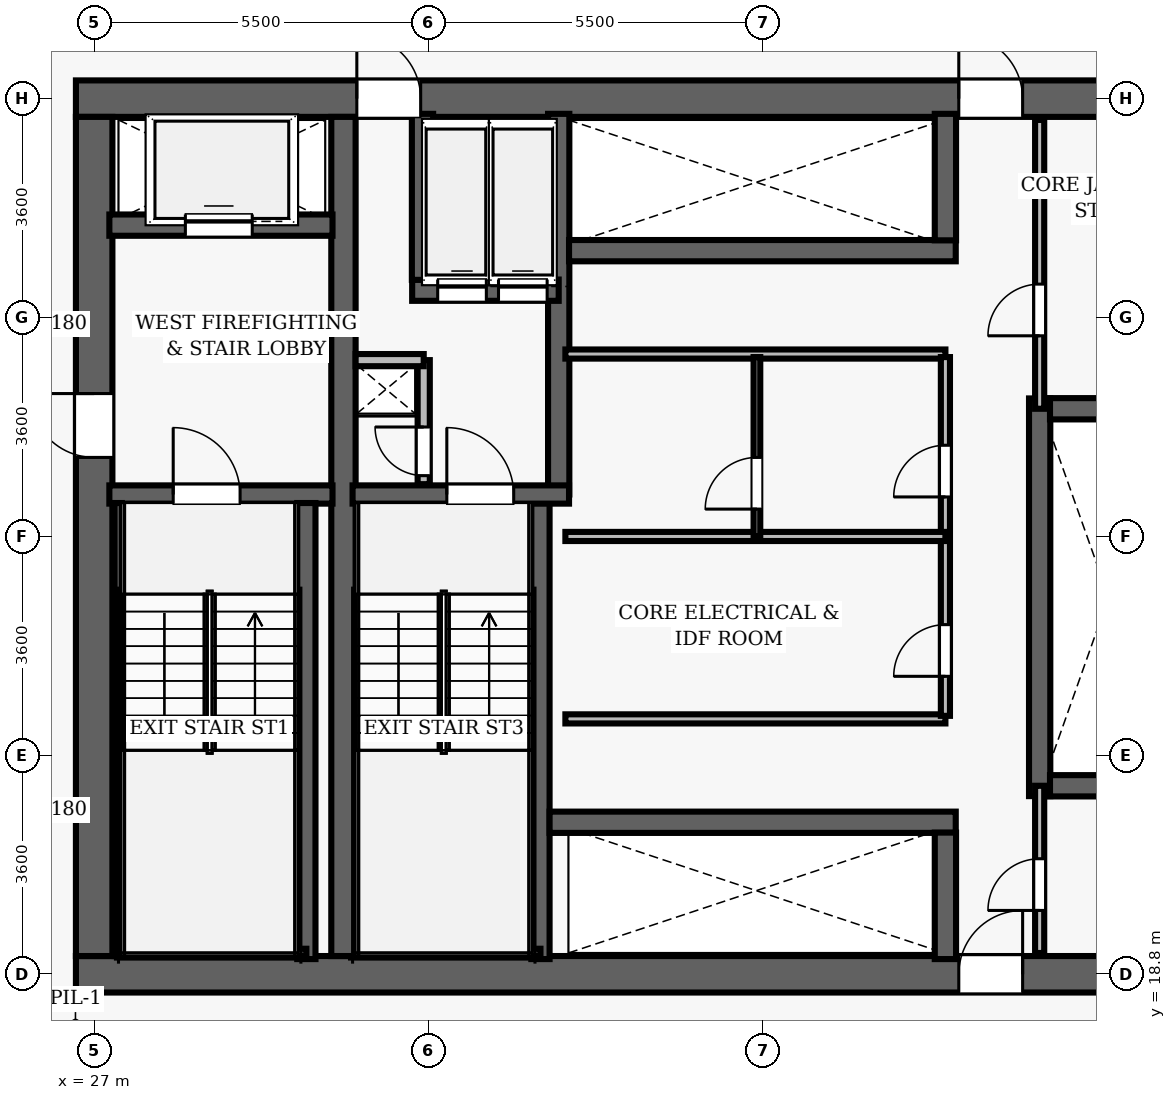
"""IFC4 building model, lengths in metres.
Left out: names, types, materials, properties, quantities, classifications, styles, units other than length and angle.
Written with IfcOpenShell. Run it as: python <this file> out.ifc"""

import sys

from ifc_helpers import new_model, si_unit, direction, frame, frame_2d, origin, place, context, subcontext, project, spatial, rectangle, extrude, element, fill, save


model = new_model("IFC4")
c1 = context("Model", 3, precision=1e-05, world=origin(), true_north=direction((0.0, 1.0)))
c2 = subcontext(c1, "Body", "Model", "MODEL_VIEW")
j1 = project(units=[si_unit("LENGTHUNIT", "METRE"), si_unit("PLANEANGLEUNIT", "RADIAN")], contexts=[c1])
p1 = place(None, origin())
s1 = spatial("IfcSite", under=j1, at=p1, CompositionType="ELEMENT")
p2 = place(p1, origin())
s2 = spatial("IfcBuilding", under=s1, at=p2, CompositionType="ELEMENT")
p3 = place(p2, frame((0.0, 0.0, 12.0)))
s3 = spatial("IfcBuildingStorey", under=s2, at=p3, CompositionType="ELEMENT", Elevation=12.0)
p4 = place(p3, frame((26.7, 18.8, 0.0), z_axis=(0.0, 0.0, 1.0), x_axis=(1.0, 0.0, 0.0)))
e1 = element("IfcWall", 1, at=p4, inside=s3, PredefinedType="SHEAR", context=c2, shape_type="SweptSolid", body=[
    extrude(rectangle(XDim=22.6, YDim=0.6, at=frame_2d((11.3, 0.0))), origin(), (0.0, 0.0, 1.0), 6.6),
])
p5 = place(p4, frame((14.52, 0.0, 0.0)))
e2 = element("IfcOpeningElement", 2, at=p5, cuts=e1, PredefinedType="OPENING", context=c2, shape_type="SweptSolid", body=[
    extrude(rectangle(XDim=1.05, YDim=2.15, at=frame_2d((0.525, 1.075))), frame((0.0, 0.31, 0.0), z_axis=(0.0, -1.0, 0.0), x_axis=(1.0, 0.0, 0.0)), (0.0, 0.0, 1.0), 0.62),
])
p6 = place(p3, frame((26.7, 33.2, 0.0), z_axis=(0.0, 0.0, 1.0), x_axis=(1.0, 0.0, 0.0)))
e3 = element("IfcWall", 3, at=p6, inside=s3, PredefinedType="SHEAR", context=c2, shape_type="SweptSolid", body=[
    extrude(rectangle(XDim=22.6, YDim=0.6, at=frame_2d((11.3, 0.0))), origin(), (0.0, 0.0, 1.0), 6.6),
])
p7 = place(p6, frame((4.62, 0.0, 0.0)))
e4 = element("IfcOpeningElement", 4, at=p7, cuts=e3, PredefinedType="OPENING", context=c2, shape_type="SweptSolid", body=[
    extrude(rectangle(XDim=1.05, YDim=2.15, at=frame_2d((0.525, 1.075))), frame((0.0, 0.31, 0.0), z_axis=(0.0, -1.0, 0.0), x_axis=(1.0, 0.0, 0.0)), (0.0, 0.0, 1.0), 0.62),
])
p8 = place(p6, frame((14.52, 0.0, 0.0)))
e5 = element("IfcOpeningElement", 5, at=p8, cuts=e3, PredefinedType="OPENING", context=c2, shape_type="SweptSolid", body=[
    extrude(rectangle(XDim=1.05, YDim=2.15, at=frame_2d((0.525, 1.075))), frame((0.0, 0.31, 0.0), z_axis=(0.0, -1.0, 0.0), x_axis=(1.0, 0.0, 0.0)), (0.0, 0.0, 1.0), 0.62),
])
p9 = place(p3, frame((27.0, 19.1, 0.0), z_axis=(0.0, 0.0, 1.0), x_axis=(0.0, 1.0, 0.0)))
e6 = element("IfcWall", 6, at=p9, inside=s3, PredefinedType="SHEAR", context=c2, shape_type="SweptSolid", body=[
    extrude(rectangle(XDim=13.8, YDim=0.6, at=frame_2d((6.9, 0.0))), origin(), (0.0, 0.0, 1.0), 6.6),
])
p10 = place(p9, frame((8.2, 0.0, 0.0)))
e7 = element("IfcOpeningElement", 7, at=p10, cuts=e6, PredefinedType="OPENING", context=c2, shape_type="SweptSolid", body=[
    extrude(rectangle(XDim=1.05, YDim=2.15, at=frame_2d((0.525, 1.075))), frame((0.0, 0.31, 0.0), z_axis=(0.0, -1.0, 0.0), x_axis=(1.0, 0.0, 0.0)), (0.0, 0.0, 1.0), 0.62),
])
p11 = place(p3, frame((31.1, 19.1, 0.0), z_axis=(0.0, 0.0, 1.0), x_axis=(0.0, 1.0, 0.0)))
e8 = element("IfcWall", 8, at=p11, inside=s3, PredefinedType="SHEAR", context=c2, shape_type="SweptSolid", body=[
    extrude(rectangle(XDim=13.8, YDim=0.4, at=frame_2d((6.9, 0.0))), origin(), (0.0, 0.0, 1.0), 6.6),
])
p12 = place(p3, frame((27.25, 26.69, 0.0), z_axis=(0.0, 0.0, 1.0), x_axis=(1.0, 0.0, 0.0)))
e9 = element("IfcWall", 9, at=p12, inside=s3, PredefinedType="SHEAR", context=c2, shape_type="SweptSolid", body=[
    extrude(rectangle(XDim=3.67, YDim=0.3, at=frame_2d((1.835, 0.0))), origin(), (0.0, 0.0, 1.0), 6.6),
])
p13 = place(p12, frame((1.05, 0.0, 0.0)))
e10 = element("IfcOpeningElement", 10, at=p13, cuts=e9, PredefinedType="OPENING", context=c2, shape_type="SweptSolid", body=[
    extrude(rectangle(XDim=1.1, YDim=2.15, at=frame_2d((0.55, 1.075))), frame((0.0, 0.16, 0.0), z_axis=(0.0, -1.0, 0.0), x_axis=(1.0, 0.0, 0.0)), (0.0, 0.0, 1.0), 0.32),
])
p14 = place(p3, frame((30.49, 19.05, 0.0), z_axis=(0.0, 0.0, 1.0), x_axis=(0.0, 1.0, 0.0)))
e11 = element("IfcWall", 11, at=p14, inside=s3, PredefinedType="SHEAR", context=c2, shape_type="SweptSolid", body=[
    extrude(rectangle(XDim=7.5, YDim=0.3, at=frame_2d((3.75, 0.0))), origin(), (0.0, 0.0, 1.0), 6.6),
])
p15 = place(p3, frame((27.395, 19.1, 0.0), z_axis=(0.0, 0.0, 1.0), x_axis=(0.0, 1.0, 0.0)))
e12 = element("IfcWall", 12, at=p15, inside=s3, PredefinedType="SHEAR", context=c2, shape_type="SweptSolid", body=[
    extrude(rectangle(XDim=7.45, YDim=0.12, at=frame_2d((3.725, 0.0))), origin(), (0.0, 0.0, 1.0), 6.6),
])
p16 = place(p3, frame((27.395, 19.16, 0.0), z_axis=(0.0, 0.0, 1.0), x_axis=(1.0, 0.0, 0.0)))
e13 = element("IfcWall", 13, at=p16, inside=s3, PredefinedType="SHEAR", context=c2, shape_type="SweptSolid", body=[
    extrude(rectangle(XDim=3.095, YDim=0.12, at=frame_2d((1.547, 0.0))), origin(), (0.0, 0.0, 1.0), 6.6),
])
p17 = place(p3, frame((27.25, 31.12, 0.0), z_axis=(0.0, 0.0, 1.0), x_axis=(1.0, 0.0, 0.0)))
e14 = element("IfcWall", 14, at=p17, inside=s3, PredefinedType="SHEAR", context=c2, shape_type="SweptSolid", body=[
    extrude(rectangle(XDim=3.67, YDim=0.35, at=frame_2d((1.835, 0.0))), origin(), (0.0, 0.0, 1.0), 5.31),
])
p18 = place(p17, frame((1.25, 0.0, 0.0)))
e15 = element("IfcOpeningElement", 15, at=p18, cuts=e14, PredefinedType="OPENING", context=c2, shape_type="SweptSolid", body=[
    extrude(rectangle(XDim=1.1, YDim=2.15, at=frame_2d((0.55, 1.075))), frame((0.0, 0.185, 0.0), z_axis=(0.0, -1.0, 0.0), x_axis=(1.0, 0.0, 0.0)), (0.0, 0.0, 1.0), 0.37),
])
p19 = place(p3, frame((34.34, 19.05, 0.0), z_axis=(0.0, 0.0, 1.0), x_axis=(0.0, 1.0, 0.0)))
e16 = element("IfcWall", 16, at=p19, inside=s3, PredefinedType="SHEAR", context=c2, shape_type="SweptSolid", body=[
    extrude(rectangle(XDim=7.5, YDim=0.3, at=frame_2d((3.75, 0.0))), origin(), (0.0, 0.0, 1.0), 6.6),
])
p20 = place(p3, frame((34.64, 26.69, 0.0), z_axis=(0.0, 0.0, 1.0), x_axis=(0.0, 1.0, 0.0)))
e17 = element("IfcWall", 17, at=p20, inside=s3, PredefinedType="SHEAR", context=c2, shape_type="SweptSolid", body=[
    extrude(rectangle(XDim=6.26, YDim=0.35, at=frame_2d((3.13, 0.0))), origin(), (0.0, 0.0, 1.0), 6.6),
])
p21 = place(p3, frame((31.25, 26.69, 0.0), z_axis=(0.0, 0.0, 1.0), x_axis=(1.0, 0.0, 0.0)))
e18 = element("IfcWall", 18, at=p21, inside=s3, PredefinedType="SHEAR", context=c2, shape_type="SweptSolid", body=[
    extrude(rectangle(XDim=3.56, YDim=0.3, at=frame_2d((1.78, 0.0))), origin(), (0.0, 0.0, 1.0), 6.6),
])
p22 = place(p21, frame((1.55, 0.0, 0.0)))
e19 = element("IfcOpeningElement", 19, at=p22, cuts=e18, PredefinedType="OPENING", context=c2, shape_type="SweptSolid", body=[
    extrude(rectangle(XDim=1.1, YDim=2.15, at=frame_2d((0.55, 1.075))), frame((0.0, 0.16, 0.0), z_axis=(0.0, -1.0, 0.0), x_axis=(1.0, 0.0, 0.0)), (0.0, 0.0, 1.0), 0.32),
])
p23 = place(p3, frame((31.3, 19.16, 0.0), z_axis=(0.0, 0.0, 1.0), x_axis=(1.0, 0.0, 0.0)))
e20 = element("IfcWall", 20, at=p23, inside=s3, PredefinedType="SHEAR", context=c2, shape_type="SweptSolid", body=[
    extrude(rectangle(XDim=3.04, YDim=0.12, at=frame_2d((1.52, 0.0))), origin(), (0.0, 0.0, 1.0), 6.6),
])
p24 = place(p3, frame((32.23, 30.05, 0.0), z_axis=(0.0, 0.0, 1.0), x_axis=(1.0, 0.0, 0.0)))
e21 = element("IfcWall", 21, at=p24, inside=s3, PredefinedType="SHEAR", context=c2, shape_type="SweptSolid", body=[
    extrude(rectangle(XDim=2.41, YDim=0.35, at=frame_2d((1.205, 0.0))), origin(), (0.0, 0.0, 1.0), 5.31),
])
p25 = place(p24, frame((0.42, 0.0, 0.0)))
e22 = element("IfcOpeningElement", 22, at=p25, cuts=e21, PredefinedType="OPENING", context=c2, shape_type="SweptSolid", body=[
    extrude(rectangle(XDim=0.8, YDim=2.15, at=frame_2d((0.4, 1.075))), frame((0.0, 0.185, 0.0), z_axis=(0.0, -1.0, 0.0), x_axis=(1.0, 0.0, 0.0)), (0.0, 0.0, 1.0), 0.37),
])
p26 = place(p24, frame((1.42, 0.0, 0.0)))
e23 = element("IfcOpeningElement", 23, at=p26, cuts=e21, PredefinedType="OPENING", context=c2, shape_type="SweptSolid", body=[
    extrude(rectangle(XDim=0.8, YDim=2.15, at=frame_2d((0.4, 1.075))), frame((0.0, 0.185, 0.0), z_axis=(0.0, -1.0, 0.0), x_axis=(1.0, 0.0, 0.0)), (0.0, 0.0, 1.0), 0.37),
])
p27 = place(p3, frame((32.4, 30.22, 0.0), z_axis=(0.0, 0.0, 1.0), x_axis=(0.0, 1.0, 0.0)))
e24 = element("IfcWall", 24, at=p27, inside=s3, PredefinedType="SHEAR", context=c2, shape_type="SweptSolid", body=[
    extrude(rectangle(XDim=2.73, YDim=0.35, at=frame_2d((1.365, 0.0))), origin(), (0.0, 0.0, 1.0), 5.31),
])
p28 = place(p3, frame((32.42, 26.86, 0.0), z_axis=(0.0, 0.0, 1.0), x_axis=(0.0, 1.0, 0.0)))
e25 = element("IfcWall", 25, at=p28, inside=s3, PredefinedType="PARTITIONING", context=c2, shape_type="SweptSolid", body=[
    extrude(rectangle(XDim=2.04, YDim=0.2, at=frame_2d((1.02, 0.0))), origin(), (0.0, 0.0, 1.0), 5.31),
])
p29 = place(p28, frame((0.14, 0.0, 0.0)))
e26 = element("IfcOpeningElement", 26, at=p29, cuts=e25, PredefinedType="OPENING", context=c2, shape_type="SweptSolid", body=[
    extrude(rectangle(XDim=0.8, YDim=2.05, at=frame_2d((0.4, 1.025))), frame((0.0, 0.11, 0.0), z_axis=(0.0, -1.0, 0.0), x_axis=(1.0, 0.0, 0.0)), (0.0, 0.0, 1.0), 0.22),
])
p30 = place(p3, frame((31.3, 28.9, 0.0), z_axis=(0.0, 0.0, 1.0), x_axis=(1.0, 0.0, 0.0)))
e27 = element("IfcWall", 27, at=p30, inside=s3, PredefinedType="PARTITIONING", context=c2, shape_type="SweptSolid", body=[
    extrude(rectangle(XDim=1.12, YDim=0.2, at=frame_2d((0.56, 0.0))), origin(), (0.0, 0.0, 1.0), 5.31),
])
p31 = place(p3, frame((42.55, 21.73, 0.0), z_axis=(0.0, 0.0, 1.0), x_axis=(0.0, 1.0, 0.0)))
e28 = element("IfcWall", 28, at=p31, inside=s3, PredefinedType="SHEAR", context=c2, shape_type="SweptSolid", body=[
    extrude(rectangle(XDim=6.54, YDim=0.35, at=frame_2d((3.27, 0.0))), origin(), (0.0, 0.0, 1.0), 5.31),
])
for number, where, z_axis, x_axis in (
    (29, (42.72, 21.9, 0.0), (0.0, 0.0, 1.0), (1.0, 0.0, 0.0)),
    (30, (42.72, 28.1, 0.0), (0.0, 0.0, 1.0), (1.0, 0.0, 0.0)),
):
    element("IfcWall", number, at=place(p3, frame(where, z_axis=z_axis, x_axis=x_axis)), inside=s3, PredefinedType="SHEAR", context=c2, shape_type="SweptSolid", body=[
        extrude(rectangle(XDim=2.03, YDim=0.35, at=frame_2d((1.015, 0.0))), origin(), (0.0, 0.0, 1.0), 5.31),
    ])
p32 = place(p3, frame((34.81, 30.7, 0.0), z_axis=(0.0, 0.0, 1.0), x_axis=(1.0, 0.0, 0.0)))
e31 = element("IfcWall", 31, at=p32, inside=s3, PredefinedType="SHEAR", context=c2, shape_type="SweptSolid", body=[
    extrude(rectangle(XDim=6.36, YDim=0.35, at=frame_2d((3.18, 0.0))), origin(), (0.0, 0.0, 1.0), 5.31),
])
p33 = place(p3, frame((41.0, 30.87, 0.0), z_axis=(0.0, 0.0, 1.0), x_axis=(0.0, 1.0, 0.0)))
e32 = element("IfcWall", 32, at=p33, inside=s3, PredefinedType="SHEAR", context=c2, shape_type="SweptSolid", body=[
    extrude(rectangle(XDim=2.08, YDim=0.35, at=frame_2d((1.04, 0.0))), origin(), (0.0, 0.0, 1.0), 5.31),
])
p34 = place(p3, frame((34.49, 21.3, 0.0), z_axis=(0.0, 0.0, 1.0), x_axis=(1.0, 0.0, 0.0)))
e33 = element("IfcWall", 33, at=p34, inside=s3, PredefinedType="SHEAR", context=c2, shape_type="SweptSolid", body=[
    extrude(rectangle(XDim=6.68, YDim=0.35, at=frame_2d((3.34, 0.0))), origin(), (0.0, 0.0, 1.0), 5.31),
])
p35 = place(p3, frame((41.0, 19.05, 0.0), z_axis=(0.0, 0.0, 1.0), x_axis=(0.0, 1.0, 0.0)))
e34 = element("IfcWall", 34, at=p35, inside=s3, PredefinedType="SHEAR", context=c2, shape_type="SweptSolid", body=[
    extrude(rectangle(XDim=2.08, YDim=0.35, at=frame_2d((1.04, 0.0))), origin(), (0.0, 0.0, 1.0), 5.31),
])
for number, where, z_axis, x_axis in (
    (35, (34.75, 29.0, 0.0), (0.0, 0.0, 1.0), (1.0, 0.0, 0.0)),
    (36, (34.75, 23.0, 0.0), (0.0, 0.0, 1.0), (1.0, 0.0, 0.0)),
):
    element("IfcWall", number, at=place(p3, frame(where, z_axis=z_axis, x_axis=x_axis)), inside=s3, PredefinedType="PARTITIONING", context=c2, shape_type="SweptSolid", body=[
        extrude(rectangle(XDim=6.25, YDim=0.15, at=frame_2d((3.125, 0.0))), origin(), (0.0, 0.0, 1.0), 5.31),
    ])
p36 = place(p3, frame((41.0, 23.05, 0.0), z_axis=(0.0, 0.0, 1.0), x_axis=(0.0, 1.0, 0.0)))
e37 = element("IfcWall", 37, at=p36, inside=s3, PredefinedType="PARTITIONING", context=c2, shape_type="SweptSolid", body=[
    extrude(rectangle(XDim=5.9, YDim=0.15, at=frame_2d((2.95, 0.0))), origin(), (0.0, 0.0, 1.0), 5.31),
])
p37 = place(p36, frame((0.65, 0.0, 0.0)))
e38 = element("IfcOpeningElement", 38, at=p37, cuts=e37, PredefinedType="OPENING", context=c2, shape_type="SweptSolid", body=[
    extrude(rectangle(XDim=0.85, YDim=2.1, at=frame_2d((0.425, 1.05))), frame((0.0, 0.085, 0.0), z_axis=(0.0, -1.0, 0.0), x_axis=(1.0, 0.0, 0.0)), (0.0, 0.0, 1.0), 0.17),
])
p38 = place(p36, frame((3.6, 0.0, 0.0)))
e39 = element("IfcOpeningElement", 39, at=p38, cuts=e37, PredefinedType="OPENING", context=c2, shape_type="SweptSolid", body=[
    extrude(rectangle(XDim=0.85, YDim=2.1, at=frame_2d((0.425, 1.05))), frame((0.0, 0.085, 0.0), z_axis=(0.0, -1.0, 0.0), x_axis=(1.0, 0.0, 0.0)), (0.0, 0.0, 1.0), 0.17),
])
p39 = place(p3, frame((34.75, 26.0, 0.0), z_axis=(0.0, 0.0, 1.0), x_axis=(1.0, 0.0, 0.0)))
e40 = element("IfcWall", 40, at=p39, inside=s3, PredefinedType="PARTITIONING", context=c2, shape_type="SweptSolid", body=[
    extrude(rectangle(XDim=6.25, YDim=0.15, at=frame_2d((3.125, 0.0))), origin(), (0.0, 0.0, 1.0), 5.31),
])
p40 = place(p3, frame((37.9, 26.0, 0.0), z_axis=(0.0, 0.0, 1.0), x_axis=(0.0, 1.0, 0.0)))
e41 = element("IfcWall", 41, at=p40, inside=s3, PredefinedType="PARTITIONING", context=c2, shape_type="SweptSolid", body=[
    extrude(rectangle(XDim=2.95, YDim=0.11, at=frame_2d((1.475, 0.0))), origin(), (0.0, 0.0, 1.0), 5.31),
])
p41 = place(p40, frame((0.45, 0.0, 0.0)))
e42 = element("IfcOpeningElement", 42, at=p41, cuts=e41, PredefinedType="OPENING", context=c2, shape_type="SweptSolid", body=[
    extrude(rectangle(XDim=0.85, YDim=2.1, at=frame_2d((0.425, 1.05))), frame((0.0, 0.065, 0.0), z_axis=(0.0, -1.0, 0.0), x_axis=(1.0, 0.0, 0.0)), (0.0, 0.0, 1.0), 0.13),
])
p42 = place(p3, frame((42.55, 28.1, 0.0), z_axis=(0.0, 0.0, 1.0), x_axis=(0.0, 1.0, 0.0)))
e43 = element("IfcWall", 43, at=p42, inside=s3, PredefinedType="PARTITIONING", context=c2, shape_type="SweptSolid", body=[
    extrude(rectangle(XDim=4.75, YDim=0.15, at=frame_2d((2.375, 0.0))), origin(), (0.0, 0.0, 1.0), 5.31),
])
p43 = place(p42, frame((1.2, 0.0, 0.0)))
e44 = element("IfcOpeningElement", 44, at=p43, cuts=e43, PredefinedType="OPENING", context=c2, shape_type="SweptSolid", body=[
    extrude(rectangle(XDim=0.85, YDim=2.1, at=frame_2d((0.425, 1.05))), frame((0.0, 0.085, 0.0), z_axis=(0.0, -1.0, 0.0), x_axis=(1.0, 0.0, 0.0)), (0.0, 0.0, 1.0), 0.17),
])
p44 = place(p3, frame((42.55, 19.15, 0.0), z_axis=(0.0, 0.0, 1.0), x_axis=(0.0, 1.0, 0.0)))
e45 = element("IfcWall", 45, at=p44, inside=s3, PredefinedType="PARTITIONING", context=c2, shape_type="SweptSolid", body=[
    extrude(rectangle(XDim=2.75, YDim=0.15, at=frame_2d((1.375, 0.0))), origin(), (0.0, 0.0, 1.0), 5.31),
])
p45 = place(p44, frame((0.7, 0.0, 0.0)))
e46 = element("IfcOpeningElement", 46, at=p45, cuts=e45, PredefinedType="OPENING", context=c2, shape_type="SweptSolid", body=[
    extrude(rectangle(XDim=0.85, YDim=2.1, at=frame_2d((0.425, 1.05))), frame((0.0, 0.085, 0.0), z_axis=(0.0, -1.0, 0.0), x_axis=(1.0, 0.0, 0.0)), (0.0, 0.0, 1.0), 0.17),
])
p46 = place(p13, origin())
e47 = element("IfcDoor", 47, at=p46, inside=s3, OperationType="SINGLE_SWING_LEFT", PredefinedType="DOOR", context=c2, shape_type="SweptSolid", body=[
    extrude(rectangle(XDim=1.1, YDim=2.15, at=frame_2d((0.55, 1.075))), frame((0.0, 0.025, 0.0), z_axis=(0.0, -1.0, 0.0), x_axis=(1.0, 0.0, 0.0)), (0.0, 0.0, 1.0), 0.05),
])
fill(e10, e47)
p47 = place(p10, origin())
e48 = element("IfcDoor", 48, at=p47, inside=s3, OperationType="SINGLE_SWING_RIGHT", PredefinedType="DOOR", context=c2, shape_type="SweptSolid", body=[
    extrude(rectangle(XDim=1.05, YDim=2.15, at=frame_2d((0.525, 1.075))), frame((0.0, 0.025, 0.0), z_axis=(0.0, -1.0, 0.0), x_axis=(1.0, 0.0, 0.0)), (0.0, 0.0, 1.0), 0.05),
])
fill(e7, e48)
p48 = place(p22, origin())
e49 = element("IfcDoor", 49, at=p48, inside=s3, OperationType="SINGLE_SWING_LEFT", PredefinedType="DOOR", context=c2, shape_type="SweptSolid", body=[
    extrude(rectangle(XDim=1.1, YDim=2.15, at=frame_2d((0.55, 1.075))), frame((0.0, 0.025, 0.0), z_axis=(0.0, -1.0, 0.0), x_axis=(1.0, 0.0, 0.0)), (0.0, 0.0, 1.0), 0.05),
])
fill(e19, e49)
p49 = place(p29, origin())
e50 = element("IfcDoor", 50, at=p49, inside=s3, OperationType="SINGLE_SWING_RIGHT", PredefinedType="DOOR", context=c2, shape_type="SweptSolid", body=[
    extrude(rectangle(XDim=0.8, YDim=2.05, at=frame_2d((0.4, 1.025))), frame((0.0, 0.025, 0.0), z_axis=(0.0, -1.0, 0.0), x_axis=(1.0, 0.0, 0.0)), (0.0, 0.0, 1.0), 0.05),
])
fill(e26, e50)
p50 = place(p7, origin())
e51 = element("IfcDoor", 51, at=p50, inside=s3, OperationType="SINGLE_SWING_LEFT", PredefinedType="DOOR", context=c2, shape_type="SweptSolid", body=[
    extrude(rectangle(XDim=1.05, YDim=2.15, at=frame_2d((0.525, 1.075))), frame((0.0, 0.025, 0.0), z_axis=(0.0, -1.0, 0.0), x_axis=(1.0, 0.0, 0.0)), (0.0, 0.0, 1.0), 0.05),
])
fill(e4, e51)
p51 = place(p8, origin())
e52 = element("IfcDoor", 52, at=p51, inside=s3, OperationType="SINGLE_SWING_LEFT", PredefinedType="DOOR", context=c2, shape_type="SweptSolid", body=[
    extrude(rectangle(XDim=1.05, YDim=2.15, at=frame_2d((0.525, 1.075))), frame((0.0, 0.025, 0.0), z_axis=(0.0, -1.0, 0.0), x_axis=(1.0, 0.0, 0.0)), (0.0, 0.0, 1.0), 0.05),
])
fill(e5, e52)
p52 = place(p5, origin())
e53 = element("IfcDoor", 53, at=p52, inside=s3, OperationType="SINGLE_SWING_RIGHT", PredefinedType="DOOR", context=c2, shape_type="SweptSolid", body=[
    extrude(rectangle(XDim=1.05, YDim=2.15, at=frame_2d((0.525, 1.075))), frame((0.0, 0.025, 0.0), z_axis=(0.0, -1.0, 0.0), x_axis=(1.0, 0.0, 0.0)), (0.0, 0.0, 1.0), 0.05),
])
fill(e2, e53)
p53 = place(p37, origin())
e54 = element("IfcDoor", 54, at=p53, inside=s3, OperationType="SINGLE_SWING_LEFT", PredefinedType="DOOR", context=c2, shape_type="SweptSolid", body=[
    extrude(rectangle(XDim=0.85, YDim=2.1, at=frame_2d((0.425, 1.05))), frame((0.0, 0.025, 0.0), z_axis=(0.0, -1.0, 0.0), x_axis=(1.0, 0.0, 0.0)), (0.0, 0.0, 1.0), 0.05),
])
fill(e38, e54)
p54 = place(p38, origin())
e55 = element("IfcDoor", 55, at=p54, inside=s3, OperationType="SINGLE_SWING_LEFT", PredefinedType="DOOR", context=c2, shape_type="SweptSolid", body=[
    extrude(rectangle(XDim=0.85, YDim=2.1, at=frame_2d((0.425, 1.05))), frame((0.0, 0.025, 0.0), z_axis=(0.0, -1.0, 0.0), x_axis=(1.0, 0.0, 0.0)), (0.0, 0.0, 1.0), 0.05),
])
fill(e39, e55)
p55 = place(p41, origin())
e56 = element("IfcDoor", 56, at=p55, inside=s3, OperationType="SINGLE_SWING_LEFT", PredefinedType="DOOR", context=c2, shape_type="SweptSolid", body=[
    extrude(rectangle(XDim=0.85, YDim=2.1, at=frame_2d((0.425, 1.05))), frame((0.0, 0.025, 0.0), z_axis=(0.0, -1.0, 0.0), x_axis=(1.0, 0.0, 0.0)), (0.0, 0.0, 1.0), 0.05),
])
fill(e42, e56)
p56 = place(p43, origin())
e57 = element("IfcDoor", 57, at=p56, inside=s3, OperationType="SINGLE_SWING_LEFT", PredefinedType="DOOR", context=c2, shape_type="SweptSolid", body=[
    extrude(rectangle(XDim=0.85, YDim=2.1, at=frame_2d((0.425, 1.05))), frame((0.0, 0.025, 0.0), z_axis=(0.0, -1.0, 0.0), x_axis=(1.0, 0.0, 0.0)), (0.0, 0.0, 1.0), 0.05),
])
fill(e44, e57)
p57 = place(p45, origin())
e58 = element("IfcDoor", 58, at=p57, inside=s3, OperationType="SINGLE_SWING_LEFT", PredefinedType="DOOR", context=c2, shape_type="SweptSolid", body=[
    extrude(rectangle(XDim=0.85, YDim=2.1, at=frame_2d((0.425, 1.05))), frame((0.0, 0.025, 0.0), z_axis=(0.0, -1.0, 0.0), x_axis=(1.0, 0.0, 0.0)), (0.0, 0.0, 1.0), 0.05),
])
fill(e46, e58)
p58 = place(p18, origin())
e59 = element("IfcDoor", 59, at=p58, inside=s3, OperationType="SLIDING_TO_LEFT", PredefinedType="DOOR", context=c2, shape_type="SweptSolid", body=[
    extrude(rectangle(XDim=1.1, YDim=2.15, at=frame_2d((0.55, 1.075))), frame((0.0, 0.025, 0.0), z_axis=(0.0, -1.0, 0.0), x_axis=(1.0, 0.0, 0.0)), (0.0, 0.0, 1.0), 0.05),
])
fill(e15, e59)
p59 = place(p25, origin())
e60 = element("IfcDoor", 60, at=p59, inside=s3, OperationType="SLIDING_TO_LEFT", PredefinedType="DOOR", context=c2, shape_type="SweptSolid", body=[
    extrude(rectangle(XDim=0.8, YDim=2.15, at=frame_2d((0.4, 1.075))), frame((0.0, 0.025, 0.0), z_axis=(0.0, -1.0, 0.0), x_axis=(1.0, 0.0, 0.0)), (0.0, 0.0, 1.0), 0.05),
])
fill(e22, e60)
p60 = place(p26, origin())
e61 = element("IfcDoor", 61, at=p60, inside=s3, OperationType="SLIDING_TO_LEFT", PredefinedType="DOOR", context=c2, shape_type="SweptSolid", body=[
    extrude(rectangle(XDim=0.8, YDim=2.15, at=frame_2d((0.4, 1.075))), frame((0.0, 0.025, 0.0), z_axis=(0.0, -1.0, 0.0), x_axis=(1.0, 0.0, 0.0)), (0.0, 0.0, 1.0), 0.05),
])
fill(e23, e61)
save(model, sys.argv[1])
